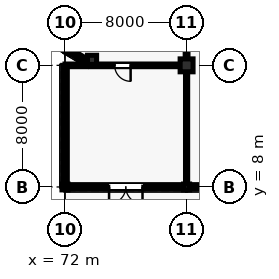
"""IFC4 building model, lengths in metres.
Left out: names, types, materials, properties, quantities, classifications, styles, units other than length and angle.
Written with IfcOpenShell. Run it as: python <this file> out.ifc"""

import sys

from ifc_helpers import new_model, si_unit, direction, frame, frame_2d, origin, origin_2d, place, context, subcontext, project, spatial, rectangle, i_section, extrude, element, fill, save


model = new_model("IFC4")
c1 = context("Model", 3, precision=1e-05, world=origin(), true_north=direction((0.0, 1.0)))
c2 = subcontext(c1, "Body", "Model", "MODEL_VIEW")
j1 = project(units=[si_unit("LENGTHUNIT", "METRE"), si_unit("PLANEANGLEUNIT", "RADIAN")], contexts=[c1])
p1 = place(None, origin())
s1 = spatial("IfcSite", under=j1, at=p1, CompositionType="ELEMENT")
p2 = place(p1, origin())
s2 = spatial("IfcBuilding", under=s1, at=p2, CompositionType="ELEMENT")
p3 = place(p2, origin())
s3 = spatial("IfcBuildingStorey", under=s2, at=p3, CompositionType="ELEMENT", Elevation=0.0)
for number, where, z_axis, x_axis in (
    (1, (72.0, 8.0, 0.0), (0.0, 0.0, 1.0), (1.0, 0.0, 0.0)),
    (2, (80.0, 8.0, 0.0), (0.0, 0.0, 1.0), (1.0, 0.0, 0.0)),
):
    element("IfcColumn", number, at=place(p3, frame(where, z_axis=z_axis, x_axis=x_axis)), inside=s3, PredefinedType="COLUMN", context=c2, shape_type="SweptSolid", body=[
        extrude(i_section(OverallWidth=0.398, OverallDepth=0.387, WebThickness=0.021, FlangeThickness=0.033, FilletRadius=0.015, at=origin_2d()), origin(), (0.0, 0.0, 1.0), 5.28),
    ])
p4 = place(p3, frame((80.0, 16.0, 0.0), z_axis=(0.0, 0.0, 1.0), x_axis=(1.0, 0.0, 0.0)))
e3 = element("IfcColumn", 3, at=p4, inside=s3, PredefinedType="COLUMN", context=c2, shape_type="SweptSolid", body=[
    extrude(rectangle(XDim=0.85, YDim=0.85, at=origin_2d()), origin(), (0.0, 0.0, 1.0), 5.28),
])
p5 = place(p3, frame((73.779, 16.364, 0.0), z_axis=(0.0, 0.0, 1.0), x_axis=(1.0, 0.0, 0.0)))
e4 = element("IfcColumn", 4, at=p5, inside=s3, PredefinedType="COLUMN", context=c2, shape_type="SweptSolid", body=[
    extrude(rectangle(XDim=0.6, YDim=0.6, at=origin_2d()), origin(), (0.0, 0.0, 1.0), 5.28),
])
p6 = place(p3, frame((72.112, 17.059, 0.0), z_axis=(0.0, 0.0, 1.0), x_axis=(0.856543302071, -0.51607516088, 0.0)))
e5 = element("IfcWall", 5, at=p6, inside=s3, PredefinedType="SOLIDWALL", context=c2, shape_type="SweptSolid", body=[
    extrude(rectangle(XDim=1.795, YDim=0.305, at=frame_2d((0.897, 0.0))), origin(), (0.0, 0.0, 1.0), 5.035),
])
p7 = place(p3, frame((72.184, 8.0, 0.0), z_axis=(0.0, 0.0, 1.0), x_axis=(1.0, 0.0, 0.0)))
e6 = element("IfcWall", 6, at=p7, inside=s3, PredefinedType="SOLIDWALL", context=c2, shape_type="SweptSolid", body=[
    extrude(rectangle(XDim=7.632, YDim=0.305, at=frame_2d((3.816, 0.0))), origin(), (0.0, 0.0, 1.0), 4.619),
])
p8 = place(p7, frame((2.716, 0.0, 0.0)))
e7 = element("IfcOpeningElement", 7, at=p8, cuts=e6, PredefinedType="OPENING", context=c2, shape_type="SweptSolid", body=[
    extrude(rectangle(XDim=2.2, YDim=2.5, at=frame_2d((1.1, 1.25))), frame((0.0, 0.162, 0.0), z_axis=(0.0, -1.0, 0.0), x_axis=(1.0, 0.0, 0.0)), (0.0, 0.0, 1.0), 0.325),
])
p9 = place(p3, frame((72.0, 8.178, 0.0), z_axis=(0.0, 0.0, 1.0), x_axis=(0.0, 1.0, 0.0)))
e8 = element("IfcWall", 8, at=p9, inside=s3, PredefinedType="SOLIDWALL", context=c2, shape_type="SweptSolid", body=[
    extrude(rectangle(XDim=7.822, YDim=0.305, at=frame_2d((3.911, 0.0))), origin(), (0.0, 0.0, 1.0), 5.035),
])
p10 = place(p9, frame((2.986, 0.0, 0.9)))
e9 = element("IfcOpeningElement", 9, at=p10, cuts=e8, PredefinedType="OPENING", context=c2, shape_type="SweptSolid", body=[
    extrude(rectangle(XDim=1.85, YDim=2.65, at=frame_2d((0.925, 1.325))), frame((0.0, 0.162, 0.0), z_axis=(0.0, -1.0, 0.0), x_axis=(1.0, 0.0, 0.0)), (0.0, 0.0, 1.0), 0.325),
])
p11 = place(p3, frame((80.184, 8.0, 0.0), z_axis=(0.0, 0.0, 1.0), x_axis=(1.0, 0.0, 0.0)))
e10 = element("IfcWall", 10, at=p11, inside=s3, PredefinedType="SOLIDWALL", context=c2, shape_type="SweptSolid", body=[
    extrude(rectangle(XDim=7.816, YDim=0.305, at=frame_2d((3.908, 0.0))), origin(), (0.0, 0.0, 1.0), 4.274),
])
p12 = place(p11, frame((2.708, 0.0, 0.0)))
e11 = element("IfcOpeningElement", 11, at=p12, cuts=e10, PredefinedType="OPENING", context=c2, shape_type="SweptSolid", body=[
    extrude(rectangle(XDim=2.4, YDim=2.7, at=frame_2d((1.2, 1.35))), frame((0.0, 0.162, 0.0), z_axis=(0.0, -1.0, 0.0), x_axis=(1.0, 0.0, 0.0)), (0.0, 0.0, 1.0), 0.325),
])
p13 = place(p3, frame((80.0, 8.184, 0.0), z_axis=(0.0, 0.0, 1.0), x_axis=(0.0, 1.0, 0.0)))
e12 = element("IfcWall", 12, at=p13, inside=s3, PredefinedType="PARTITIONING", context=c2, shape_type="SweptSolid", body=[
    extrude(rectangle(XDim=7.401, YDim=0.142, at=frame_2d((3.701, 0.0))), origin(), (0.0, 0.0, 1.0), 5.025),
])
p14 = place(p3, frame((72.0, 16.0, 0.0), z_axis=(0.0, 0.0, 1.0), x_axis=(1.0, 0.0, 0.0)))
e13 = element("IfcWall", 13, at=p14, inside=s3, PredefinedType="PARTITIONING", context=c2, shape_type="SweptSolid", body=[
    extrude(rectangle(XDim=7.585, YDim=0.175, at=frame_2d((3.792, 0.0))), origin(), (0.0, 0.0, 1.0), 5.025),
])
p15 = place(p14, frame((3.268, 0.0, 0.0)))
e14 = element("IfcOpeningElement", 14, at=p15, cuts=e13, PredefinedType="OPENING", context=c2, shape_type="SweptSolid", body=[
    extrude(rectangle(XDim=1.05, YDim=2.15, at=frame_2d((0.525, 1.075))), frame((0.0, 0.097, 0.0), z_axis=(0.0, -1.0, 0.0), x_axis=(1.0, 0.0, 0.0)), (0.0, 0.0, 1.0), 0.195),
])
p16 = place(p3, frame((80.0, 16.415, 0.0), z_axis=(0.0, 0.0, 1.0), x_axis=(0.0, 1.0, 0.0)))
e15 = element("IfcWall", 15, at=p16, inside=s3, PredefinedType="PARTITIONING", context=c2, shape_type="SweptSolid", body=[
    extrude(rectangle(XDim=7.17, YDim=0.185, at=frame_2d((3.585, 0.0))), origin(), (0.0, 0.0, 1.0), 4.603),
])
p17 = place(p16, frame((2.935, 0.0, 0.0)))
e16 = element("IfcOpeningElement", 16, at=p17, cuts=e15, PredefinedType="OPENING", context=c2, shape_type="SweptSolid", body=[
    extrude(rectangle(XDim=1.3, YDim=2.2, at=frame_2d((0.65, 1.1))), frame((0.0, 0.103, 0.0), z_axis=(0.0, -1.0, 0.0), x_axis=(1.0, 0.0, 0.0)), (0.0, 0.0, 1.0), 0.205),
])
p18 = place(p8, frame((2.2, 0.0, 0.0), z_axis=(0.0, 0.0, 1.0), x_axis=(-1.0, 0.0, 0.0)))
e17 = element("IfcDoor", 17, at=p18, inside=s3, OperationType="DOUBLE_DOOR_SINGLE_SWING", PredefinedType="DOOR", context=c2, shape_type="SweptSolid", body=[
    extrude(rectangle(XDim=2.2, YDim=2.5, at=frame_2d((1.1, 1.25))), frame((0.0, 0.025, 0.0), z_axis=(0.0, -1.0, 0.0), x_axis=(1.0, 0.0, 0.0)), (0.0, 0.0, 1.0), 0.05),
])
fill(e7, e17)
p19 = place(p10, origin())
e18 = element("IfcWindow", 18, at=p19, inside=s3, PartitioningType="SINGLE_PANEL", PredefinedType="WINDOW", context=c2, shape_type="SweptSolid", body=[
    extrude(rectangle(XDim=1.85, YDim=2.65, at=frame_2d((0.925, 1.325))), frame((0.0, 0.03, 0.0), z_axis=(0.0, -1.0, 0.0), x_axis=(1.0, 0.0, 0.0)), (0.0, 0.0, 1.0), 0.06),
])
fill(e9, e18)
p20 = place(p15, frame((1.05, 0.0, 0.0), z_axis=(0.0, 0.0, 1.0), x_axis=(-1.0, 0.0, 0.0)))
e19 = element("IfcDoor", 19, at=p20, inside=s3, OperationType="SINGLE_SWING_RIGHT", PredefinedType="DOOR", context=c2, shape_type="SweptSolid", body=[
    extrude(rectangle(XDim=1.05, YDim=2.15, at=frame_2d((0.525, 1.075))), frame((0.0, 0.025, 0.0), z_axis=(0.0, -1.0, 0.0), x_axis=(1.0, 0.0, 0.0)), (0.0, 0.0, 1.0), 0.05),
])
fill(e14, e19)
save(model, sys.argv[1])
